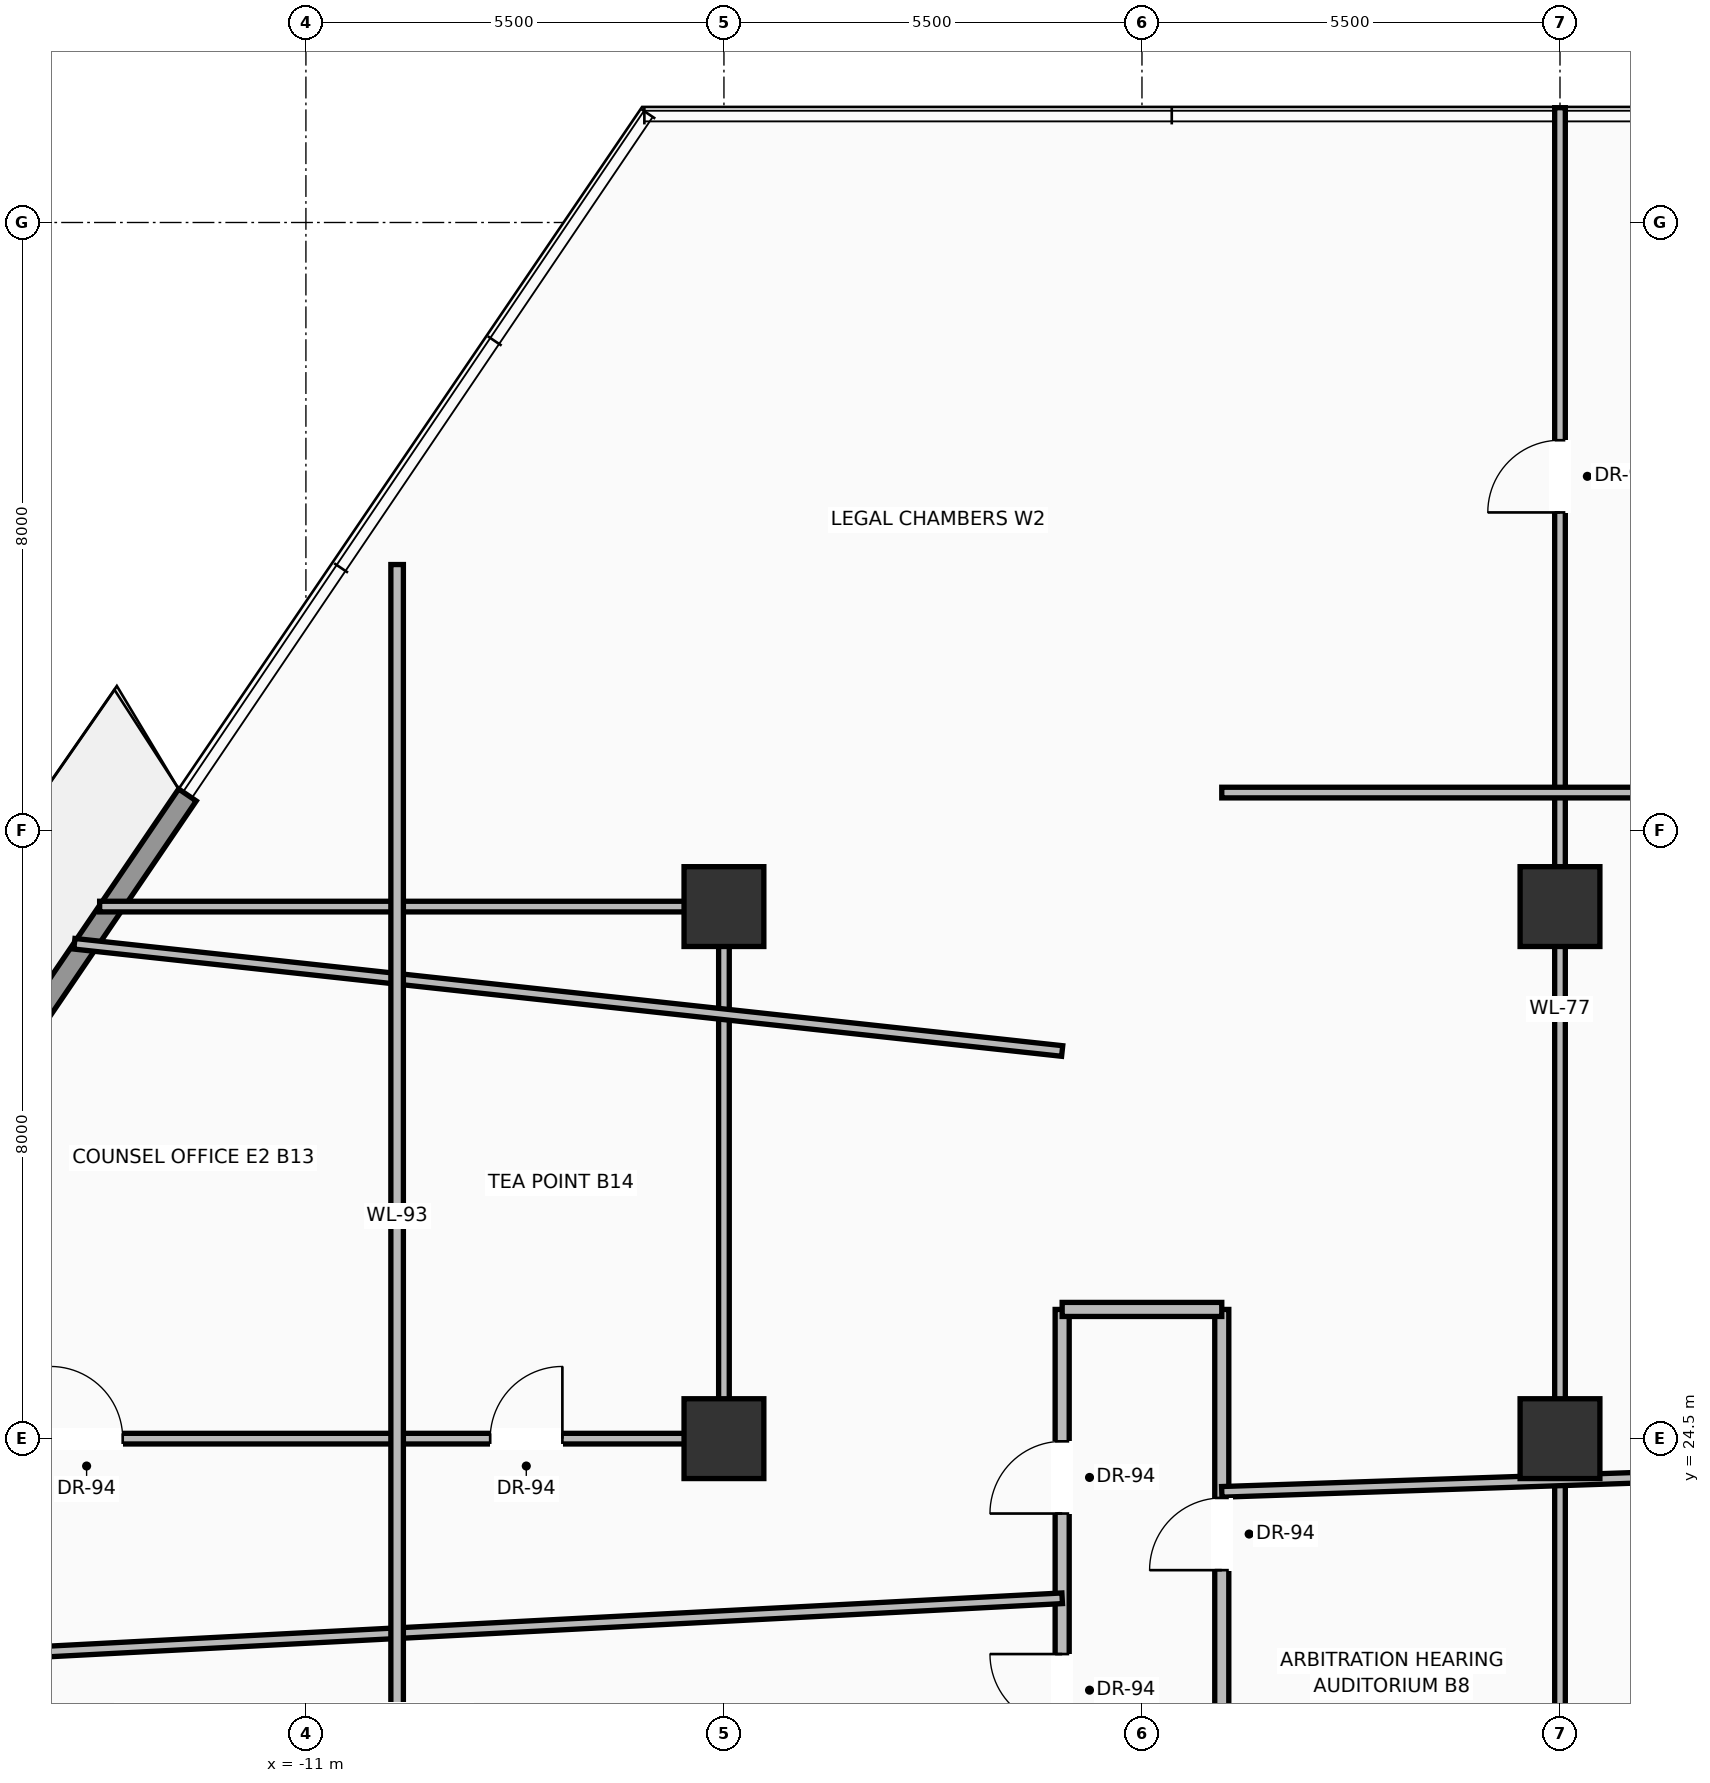
"""IFC4 building model, lengths in metres.
Left out: names, types, materials, properties, quantities, classifications, styles, units other than length and angle.
Written with IfcOpenShell. Run it as: python <this file> out.ifc"""

import sys

from ifc_helpers import new_model, si_unit, direction, frame, frame_2d, origin, origin_2d, place, context, subcontext, project, spatial, rectangle, extrude, source, transform, mapped, element, fill, save


model = new_model("IFC4")
c1 = context("Model", 3, precision=1e-05, world=origin(), true_north=direction((0.0, 1.0)))
c2 = subcontext(c1, "Body", "Model", "MODEL_VIEW")
j1 = project(units=[si_unit("LENGTHUNIT", "METRE"), si_unit("PLANEANGLEUNIT", "RADIAN")], contexts=[c1])
p1 = place(None, origin())
s1 = spatial("IfcSite", under=j1, at=p1, CompositionType="ELEMENT")
p2 = place(p1, origin())
s2 = spatial("IfcBuilding", under=s1, at=p2, CompositionType="ELEMENT")
p3 = place(p2, frame((0.0, 0.0, 64.5)))
s3 = spatial("IfcBuildingStorey", under=s2, at=p3, CompositionType="ELEMENT", Elevation=64.5)
m1 = source(origin(), c2, "Body", "SweptSolid", [
    extrude(rectangle(XDim=1.05, YDim=1.05, at=origin_2d()), origin(), (0.0, 0.0, 1.0), 3.7),
])
for number, where, z_axis, x_axis in (
    (1, (-5.5, 24.5, 0.0), (0.0, 0.0, 1.0), (1.0, 0.0, 0.0)),
    (2, (5.5, 24.5, 0.0), (0.0, 0.0, 1.0), (1.0, 0.0, 0.0)),
    (3, (-5.5, 31.5, 0.0), (0.0, 0.0, 1.0), (1.0, 0.0, 0.0)),
    (4, (5.5, 31.5, 0.0), (0.0, 0.0, 1.0), (1.0, 0.0, 0.0)),
):
    element("IfcColumn", number, at=place(p3, frame(where, z_axis=z_axis, x_axis=x_axis)), inside=s3, PredefinedType="COLUMN", context=c2, shape_type="MappedRepresentation", body=[
        mapped(m1, transform((0.0, 0.0, 0.0), scale=1.0)),
    ])
p4 = place(p3, frame((-22.141, 18.868, 0.0), z_axis=(0.0, 0.0, 1.0), x_axis=(0.562061262824, 0.8270956032, 0.0)))
e5 = element("IfcWall", 5, at=p4, inside=s3, PredefinedType="SOLIDWALL", context=c2, shape_type="SweptSolid", body=[
    extrude(rectangle(XDim=17.048, YDim=0.28, at=frame_2d((8.524, 0.0))), origin(), (0.0, 0.0, 1.0), 3.03),
])
p5 = place(p4, frame((4.092, 0.0, 0.0)))
e6 = element("IfcOpeningElement", 6, at=p5, cuts=e5, PredefinedType="OPENING", context=c2, shape_type="SweptSolid", body=[
    extrude(rectangle(XDim=1.6, YDim=2.35, at=frame_2d((0.8, 1.175))), frame((0.0, 0.15, 0.0), z_axis=(0.0, -1.0, 0.0), x_axis=(1.0, 0.0, 0.0)), (0.0, 0.0, 1.0), 0.3),
])
p6 = place(p4, frame((11.593, 0.0, 0.9)))
e7 = element("IfcOpeningElement", 7, at=p6, cuts=e5, PredefinedType="OPENING", context=c2, shape_type="SweptSolid", body=[
    extrude(rectangle(XDim=1.55, YDim=1.85, at=frame_2d((0.775, 0.925))), frame((0.0, 0.15, 0.0), z_axis=(0.0, -1.0, 0.0), x_axis=(1.0, 0.0, 0.0)), (0.0, 0.0, 1.0), 0.3),
])
p7 = place(p3, frame((-1.05, 18.85, 0.0), z_axis=(0.0, 0.0, 1.0), x_axis=(0.0, 1.0, 0.0)))
e8 = element("IfcWall", 8, at=p7, inside=s3, PredefinedType="PARTITIONING", context=c2, shape_type="SweptSolid", body=[
    extrude(rectangle(XDim=7.35, YDim=0.185, at=frame_2d((3.675, 0.0))), origin(), (0.0, 0.0, 1.0), 2.747),
])
p8 = place(p7, frame((1.866, 0.0, 0.0)))
e9 = element("IfcOpeningElement", 9, at=p8, cuts=e8, PredefinedType="OPENING", context=c2, shape_type="SweptSolid", body=[
    extrude(rectangle(XDim=0.95, YDim=2.2, at=frame_2d((0.475, 1.1))), frame((0.0, 0.103, 0.0), z_axis=(0.0, -1.0, 0.0), x_axis=(1.0, 0.0, 0.0)), (0.0, 0.0, 1.0), 0.205),
])
p9 = place(p7, frame((4.665, 0.0, 0.0)))
e10 = element("IfcOpeningElement", 10, at=p9, cuts=e8, PredefinedType="OPENING", context=c2, shape_type="SweptSolid", body=[
    extrude(rectangle(XDim=0.95, YDim=2.2, at=frame_2d((0.475, 1.1))), frame((0.0, 0.103, 0.0), z_axis=(0.0, -1.0, 0.0), x_axis=(1.0, 0.0, 0.0)), (0.0, 0.0, 1.0), 0.205),
])
p10 = place(p3, frame((1.05, 18.85, 0.0), z_axis=(0.0, 0.0, 1.0), x_axis=(0.0, 1.0, 0.0)))
e11 = element("IfcWall", 11, at=p10, inside=s3, PredefinedType="PARTITIONING", context=c2, shape_type="SweptSolid", body=[
    extrude(rectangle(XDim=7.35, YDim=0.185, at=frame_2d((3.675, 0.0))), origin(), (0.0, 0.0, 1.0), 2.747),
])
p11 = place(p10, frame((3.92, 0.0, 0.0)))
e12 = element("IfcOpeningElement", 12, at=p11, cuts=e11, PredefinedType="OPENING", context=c2, shape_type="SweptSolid", body=[
    extrude(rectangle(XDim=0.95, YDim=2.2, at=frame_2d((0.475, 1.1))), frame((0.0, 0.103, 0.0), z_axis=(0.0, -1.0, 0.0), x_axis=(1.0, 0.0, 0.0)), (0.0, 0.0, 1.0), 0.205),
])
p12 = place(p3, frame((-1.05, 26.2, 0.0), z_axis=(0.0, 0.0, 1.0), x_axis=(1.0, 0.0, 0.0)))
e13 = element("IfcWall", 13, at=p12, inside=s3, PredefinedType="PARTITIONING", context=c2, shape_type="SweptSolid", body=[
    extrude(rectangle(XDim=2.1, YDim=0.185, at=frame_2d((1.05, 0.0))), origin(), (0.0, 0.0, 1.0), 3.442),
])
p13 = place(p3, frame((5.5, 18.3, 0.0), z_axis=(0.0, 0.0, 1.0), x_axis=(0.0, 1.0, 0.0)))
e14 = element("IfcWall", 14, at=p13, inside=s3, PredefinedType="PARTITIONING", context=c2, shape_type="SweptSolid", body=[
    extrude(rectangle(XDim=23.71, YDim=0.14, at=frame_2d((11.855, 0.0))), origin(), (0.0, 0.0, 1.0), 2.747),
])
p14 = place(p13, frame((18.385, 0.0, 0.0)))
e15 = element("IfcOpeningElement", 15, at=p14, cuts=e14, PredefinedType="OPENING", context=c2, shape_type="SweptSolid", body=[
    extrude(rectangle(XDim=0.95, YDim=2.2, at=frame_2d((0.475, 1.1))), frame((0.0, 0.08, 0.0), z_axis=(0.0, -1.0, 0.0), x_axis=(1.0, 0.0, 0.0)), (0.0, 0.0, 1.0), 0.16),
])
p15 = place(p3, frame((-18.471, 24.5, 0.0), z_axis=(0.0, 0.0, 1.0), x_axis=(1.0, 0.0, 0.0)))
e16 = element("IfcWall", 16, at=p15, inside=s3, PredefinedType="PARTITIONING", context=c2, shape_type="SweptSolid", body=[
    extrude(rectangle(XDim=12.971, YDim=0.14, at=frame_2d((6.485, 0.0))), origin(), (0.0, 0.0, 1.0), 2.747),
])
p16 = place(p15, frame((4.11, 0.0, 0.0)))
e17 = element("IfcOpeningElement", 17, at=p16, cuts=e16, PredefinedType="OPENING", context=c2, shape_type="SweptSolid", body=[
    extrude(rectangle(XDim=0.95, YDim=2.2, at=frame_2d((0.475, 1.1))), frame((0.0, 0.08, 0.0), z_axis=(0.0, -1.0, 0.0), x_axis=(1.0, 0.0, 0.0)), (0.0, 0.0, 1.0), 0.16),
])
p17 = place(p15, frame((9.895, 0.0, 0.0)))
e18 = element("IfcOpeningElement", 18, at=p17, cuts=e16, PredefinedType="OPENING", context=c2, shape_type="SweptSolid", body=[
    extrude(rectangle(XDim=0.95, YDim=2.2, at=frame_2d((0.475, 1.1))), frame((0.0, 0.08, 0.0), z_axis=(0.0, -1.0, 0.0), x_axis=(1.0, 0.0, 0.0)), (0.0, 0.0, 1.0), 0.16),
])
p18 = place(p3, frame((-5.5, 24.5, 0.0), z_axis=(0.0, 0.0, 1.0), x_axis=(0.0, 1.0, 0.0)))
e19 = element("IfcWall", 19, at=p18, inside=s3, PredefinedType="PARTITIONING", context=c2, shape_type="SweptSolid", body=[
    extrude(rectangle(XDim=7.0, YDim=0.14, at=frame_2d((3.5, 0.0))), origin(), (0.0, 0.0, 1.0), 2.747),
])
p19 = place(p3, frame((-13.714, 31.5, 0.0), z_axis=(0.0, 0.0, 1.0), x_axis=(1.0, 0.0, 0.0)))
e20 = element("IfcWall", 20, at=p19, inside=s3, PredefinedType="PARTITIONING", context=c2, shape_type="SweptSolid", body=[
    extrude(rectangle(XDim=8.214, YDim=0.14, at=frame_2d((4.107, 0.0))), origin(), (0.0, 0.0, 1.0), 2.747),
])
p20 = place(p3, frame((-20.595, 21.374, 0.0), z_axis=(0.0, 0.0, 1.0), x_axis=(0.998625331151, 0.052416104246, 0.0)))
e21 = element("IfcWall", 21, at=p20, inside=s3, PredefinedType="PARTITIONING", context=c2, shape_type="SweptSolid", body=[
    extrude(rectangle(XDim=19.572, YDim=0.14, at=frame_2d((9.786, 0.0))), origin(), (0.0, 0.0, 1.0), 2.747),
])
p21 = place(p20, frame((5.233, 0.0, 0.0)))
e22 = element("IfcOpeningElement", 22, at=p21, cuts=e21, PredefinedType="OPENING", context=c2, shape_type="SweptSolid", body=[
    extrude(rectangle(XDim=0.95, YDim=2.2, at=frame_2d((0.475, 1.1))), frame((0.0, 0.08, 0.0), z_axis=(0.0, -1.0, 0.0), x_axis=(1.0, 0.0, 0.0)), (0.0, 0.0, 1.0), 0.16),
])
p22 = place(p3, frame((-14.046, 31.011, 0.0), z_axis=(0.0, 0.0, 1.0), x_axis=(0.994160894158, -0.107907907622, 0.0)))
e23 = element("IfcWall", 23, at=p22, inside=s3, PredefinedType="PARTITIONING", context=c2, shape_type="SweptSolid", body=[
    extrude(rectangle(XDim=13.073, YDim=0.14, at=frame_2d((6.536, 0.0))), origin(), (0.0, 0.0, 1.0), 2.747),
])
p23 = place(p3, frame((1.05, 23.8, 0.0), z_axis=(0.0, 0.0, 1.0), x_axis=(0.999422522818, 0.033979712843, 0.0)))
e24 = element("IfcWall", 24, at=p23, inside=s3, PredefinedType="PARTITIONING", context=c2, shape_type="SweptSolid", body=[
    extrude(rectangle(XDim=17.948, YDim=0.14, at=frame_2d((8.974, 0.0))), origin(), (0.0, 0.0, 1.0), 2.747),
])
p24 = place(p23, frame((8.082, 0.0, 0.0)))
e25 = element("IfcOpeningElement", 25, at=p24, cuts=e24, PredefinedType="OPENING", context=c2, shape_type="SweptSolid", body=[
    extrude(rectangle(XDim=0.95, YDim=2.2, at=frame_2d((0.475, 1.1))), frame((0.0, 0.08, 0.0), z_axis=(0.0, -1.0, 0.0), x_axis=(1.0, 0.0, 0.0)), (0.0, 0.0, 1.0), 0.16),
])
p25 = place(p23, frame((14.216, 0.0, 0.0)))
e26 = element("IfcOpeningElement", 26, at=p25, cuts=e24, PredefinedType="OPENING", context=c2, shape_type="SweptSolid", body=[
    extrude(rectangle(XDim=0.95, YDim=2.2, at=frame_2d((0.475, 1.1))), frame((0.0, 0.08, 0.0), z_axis=(0.0, -1.0, 0.0), x_axis=(1.0, 0.0, 0.0)), (0.0, 0.0, 1.0), 0.16),
])
p26 = place(p3, frame((1.05, 33.0, 0.0), z_axis=(0.0, 0.0, 1.0), x_axis=(1.0, 0.0, 0.0)))
e27 = element("IfcWall", 27, at=p26, inside=s3, PredefinedType="PARTITIONING", context=c2, shape_type="SweptSolid", body=[
    extrude(rectangle(XDim=12.26, YDim=0.14, at=frame_2d((6.13, 0.0))), origin(), (0.0, 0.0, 1.0), 2.747),
])
p27 = place(p3, frame((-9.8, 18.85, 0.0), z_axis=(0.0, 0.0, 1.0), x_axis=(0.0, 1.0, 0.0)))
e28 = element("IfcWall", 28, at=p27, inside=s3, PredefinedType="PARTITIONING", context=c2, shape_type="SweptSolid", body=[
    extrude(rectangle(XDim=17.15, YDim=0.165, at=frame_2d((8.575, 0.0))), origin(), (0.0, 0.0, 1.0), 2.747),
])
m2 = source(origin(), c2, "Body", "SweptSolid", [
    extrude(rectangle(XDim=0.95, YDim=2.2, at=frame_2d((0.475, 1.1))), frame((0.0, 0.025, 0.0), z_axis=(0.0, -1.0, 0.0), x_axis=(1.0, 0.0, 0.0)), (0.0, 0.0, 1.0), 0.05),
])
p28 = place(p8, origin())
e29 = element("IfcDoor", 29, at=p28, inside=s3, OperationType="SINGLE_SWING_RIGHT", PredefinedType="DOOR", context=c2, shape_type="MappedRepresentation", body=[
    mapped(m2, transform((0.0, 0.0, 0.0), scale=1.0)),
])
fill(e9, e29)
p29 = place(p11, origin())
e30 = element("IfcDoor", 30, at=p29, inside=s3, OperationType="SINGLE_SWING_LEFT", PredefinedType="DOOR", context=c2, shape_type="MappedRepresentation", body=[
    mapped(m2, transform((0.0, 0.0, 0.0), scale=1.0)),
])
fill(e12, e30)
p30 = place(p9, origin())
e31 = element("IfcDoor", 31, at=p30, inside=s3, OperationType="SINGLE_SWING_LEFT", PredefinedType="DOOR", context=c2, shape_type="MappedRepresentation", body=[
    mapped(m2, transform((0.0, 0.0, 0.0), scale=1.0)),
])
fill(e10, e31)
p31 = place(p16, origin())
e32 = element("IfcDoor", 32, at=p31, inside=s3, OperationType="SINGLE_SWING_LEFT", PredefinedType="DOOR", context=c2, shape_type="MappedRepresentation", body=[
    mapped(m2, transform((0.0, 0.0, 0.0), scale=1.0)),
])
fill(e17, e32)
p32 = place(p17, origin())
e33 = element("IfcDoor", 33, at=p32, inside=s3, OperationType="SINGLE_SWING_RIGHT", PredefinedType="DOOR", context=c2, shape_type="MappedRepresentation", body=[
    mapped(m2, transform((0.0, 0.0, 0.0), scale=1.0)),
])
fill(e18, e33)
p33 = place(p14, origin())
e34 = element("IfcDoor", 34, at=p33, inside=s3, OperationType="SINGLE_SWING_LEFT", PredefinedType="DOOR", context=c2, shape_type="MappedRepresentation", body=[
    mapped(m2, transform((0.0, 0.0, 0.0), scale=1.0)),
])
fill(e15, e34)
save(model, sys.argv[1])
